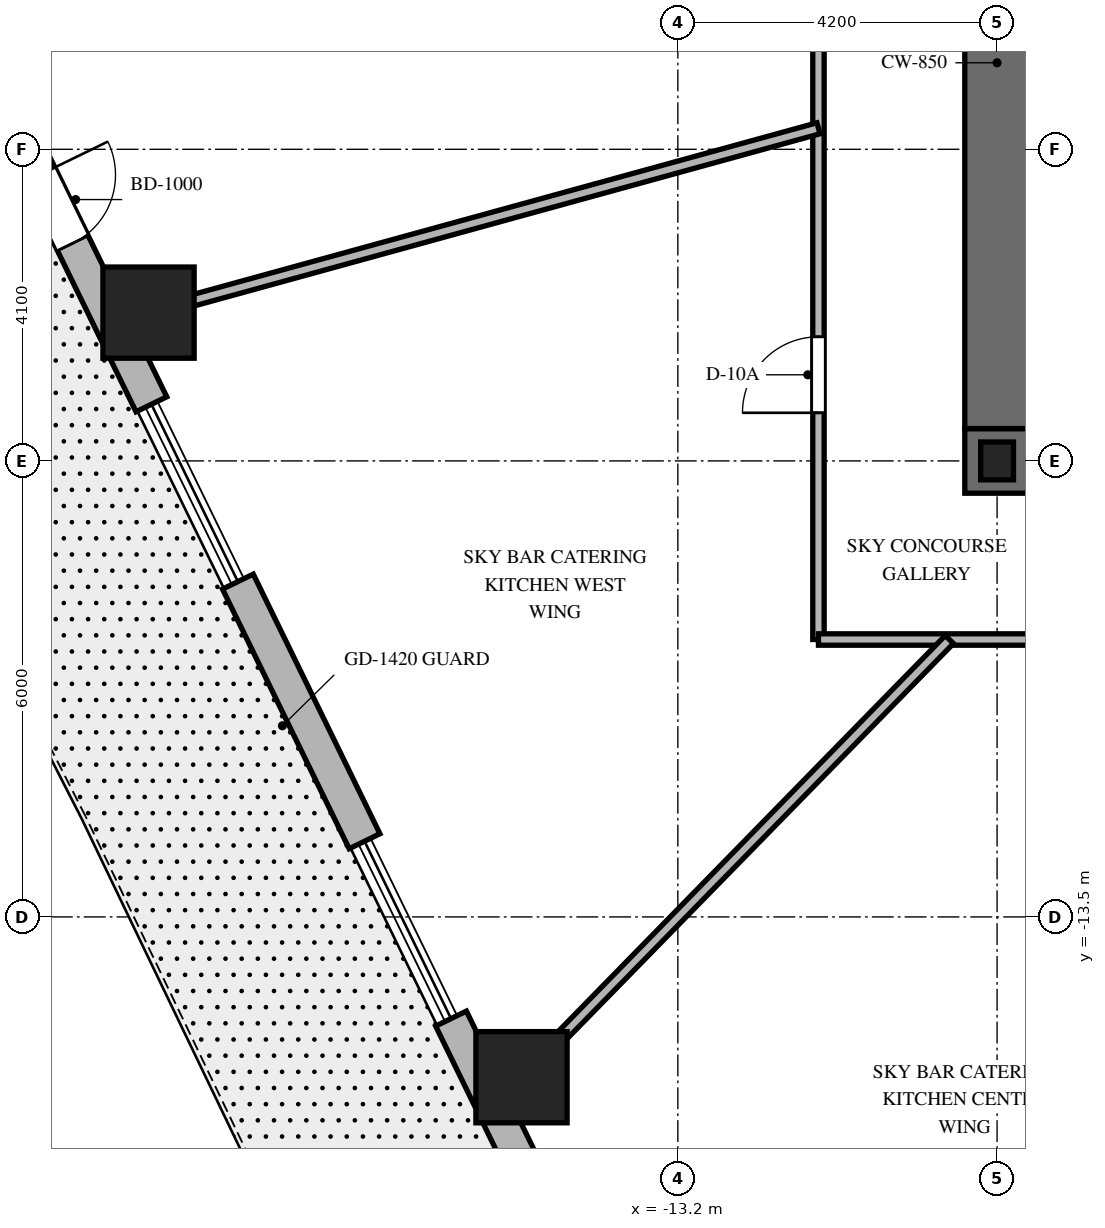
"""IFC4 building model, lengths in metres.
Left out: names, types, materials, properties, quantities, classifications, styles, units other than length and angle.
Written with IfcOpenShell. Run it as: python <this file> out.ifc"""

import sys

from ifc_helpers import new_model, si_unit, direction, frame, frame_2d, origin, origin_2d, place, context, subcontext, project, spatial, rectangle, i_section, extrude, element, fill, save


model = new_model("IFC4")
c1 = context("Model", 3, precision=1e-05, world=origin(), true_north=direction((0.0, 1.0)))
c2 = subcontext(c1, "Body", "Model", "MODEL_VIEW")
j1 = project(units=[si_unit("LENGTHUNIT", "METRE"), si_unit("PLANEANGLEUNIT", "RADIAN")], contexts=[c1])
p1 = place(None, origin())
s1 = spatial("IfcSite", under=j1, at=p1, CompositionType="ELEMENT")
p2 = place(p1, origin())
s2 = spatial("IfcBuilding", under=s1, at=p2, CompositionType="ELEMENT")
p3 = place(p2, frame((0.0, 0.0, 139.5)))
s3 = spatial("IfcBuildingStorey", under=s2, at=p3, CompositionType="ELEMENT", Elevation=139.5)
p4 = place(p3, frame((-9.425, -7.5, 0.0), z_axis=(0.0, 0.0, 1.0), x_axis=(1.0, 0.0, 0.0)))
e1 = element("IfcWall", 1, at=p4, inside=s3, PredefinedType="SHEAR", context=c2, shape_type="SweptSolid", body=[
    extrude(rectangle(XDim=18.85, YDim=0.85, at=frame_2d((9.425, 0.0))), origin(), (0.0, 0.0, 1.0), 4.8),
])
p5 = place(p4, frame((9.475, 0.0, 0.0)))
e2 = element("IfcOpeningElement", 2, at=p5, cuts=e1, PredefinedType="OPENING", context=c2, shape_type="SweptSolid", body=[
    extrude(rectangle(XDim=1.0, YDim=2.15, at=frame_2d((0.5, 1.075))), frame((0.0, 0.435, 0.0), z_axis=(0.0, -1.0, 0.0), x_axis=(1.0, 0.0, 0.0)), (0.0, 0.0, 1.0), 0.87),
])
p6 = place(p3, frame((-9.0, -7.075, 0.0), z_axis=(0.0, 0.0, 1.0), x_axis=(0.0, 1.0, 0.0)))
e3 = element("IfcWall", 3, at=p6, inside=s3, PredefinedType="SHEAR", context=c2, shape_type="SweptSolid", body=[
    extrude(rectangle(XDim=14.15, YDim=0.85, at=frame_2d((7.075, 0.0))), origin(), (0.0, 0.0, 1.0), 4.8),
])
p7 = place(p6, frame((10.2, 0.0, 0.0)))
e4 = element("IfcOpeningElement", 4, at=p7, cuts=e3, PredefinedType="OPENING", context=c2, shape_type="SweptSolid", body=[
    extrude(rectangle(XDim=1.05, YDim=2.15, at=frame_2d((0.525, 1.075))), frame((0.0, 0.435, 0.0), z_axis=(0.0, -1.0, 0.0), x_axis=(1.0, 0.0, 0.0)), (0.0, 0.0, 1.0), 0.87),
])
p8 = place(p3, frame((-9.0, -7.5, 0.0), z_axis=(0.0, 0.0, 1.0), x_axis=(1.0, 0.0, 0.0)))
e5 = element("IfcColumn", 5, at=p8, inside=s3, PredefinedType="COLUMN", context=c2, shape_type="SweptSolid", body=[
    extrude(i_section(OverallWidth=0.432, OverallDepth=0.498, WebThickness=0.056, FlangeThickness=0.089, at=origin_2d()), origin(), (0.0, 0.0, 1.0), 4.8),
])
for number, where, z_axis, x_axis in (
    (6, (-20.164, -5.549, 0.0), (0.0, 0.0, 1.0), (1.0, 0.0, 0.0)),
    (7, (-15.257, -15.609, 0.0), (0.0, 0.0, 1.0), (1.0, 0.0, 0.0)),
):
    element("IfcColumn", number, at=place(p3, frame(where, z_axis=z_axis, x_axis=x_axis)), inside=s3, PredefinedType="COLUMN", context=c2, shape_type="SweptSolid", body=[
        extrude(rectangle(XDim=1.2, YDim=1.2, at=origin_2d()), origin(), (0.0, 0.0, 1.0), 4.8),
    ])
p9 = place(p3, frame((-22.238, -2.427, 0.0), z_axis=(0.0, 0.0, 1.0), x_axis=(0.438370693728, -0.898794267272, 0.0)))
e8 = element("IfcWall", 8, at=p9, inside=s3, PredefinedType="SOLIDWALL", context=c2, shape_type="SweptSolid", body=[
    extrude(rectangle(XDim=4.816, YDim=0.45, at=frame_2d((2.408, 0.0))), origin(), (0.0, 0.0, 1.0), 4.5),
])
p10 = place(p9, frame((1.458, 0.0, 0.0)))
e9 = element("IfcOpeningElement", 9, at=p10, cuts=e8, PredefinedType="OPENING", context=c2, shape_type="SweptSolid", body=[
    extrude(rectangle(XDim=1.0, YDim=2.15, at=frame_2d((0.5, 1.075))), frame((0.0, 0.235, 0.0), z_axis=(0.0, -1.0, 0.0), x_axis=(1.0, 0.0, 0.0)), (0.0, 0.0, 1.0), 0.47),
])
p11 = place(p3, frame((-18.988, -9.088, 0.0), z_axis=(0.0, 0.0, 1.0), x_axis=(0.43837933929, -0.898790050503, 0.0)))
e10 = element("IfcWall", 10, at=p11, inside=s3, PredefinedType="SOLIDWALL", context=c2, shape_type="SweptSolid", body=[
    extrude(rectangle(XDim=3.801, YDim=0.45, at=frame_2d((1.9, 0.0))), origin(), (0.0, 0.0, 1.0), 4.5),
])
p12 = place(p3, frame((-16.184, -14.838, 0.0), z_axis=(0.0, 0.0, 1.0), x_axis=(0.43837962648, -0.898789910428, 0.0)))
e11 = element("IfcWall", 11, at=p12, inside=s3, PredefinedType="SOLIDWALL", context=c2, shape_type="SweptSolid", body=[
    extrude(rectangle(XDim=4.81, YDim=0.45, at=frame_2d((2.405, 0.0))), origin(), (0.0, 0.0, 1.0), 4.5),
])
p13 = place(p3, frame((-11.35, -9.85, 0.0), z_axis=(0.0, 0.0, 1.0), x_axis=(0.0, 1.0, 0.0)))
e12 = element("IfcWall", 12, at=p13, inside=s3, PredefinedType="PARTITIONING", context=c2, shape_type="SweptSolid", body=[
    extrude(rectangle(XDim=19.7, YDim=0.15, at=frame_2d((9.85, 0.0))), origin(), (0.0, 0.0, 1.0), 2.69),
])
p14 = place(p13, frame((15.18, 0.0, 0.0)))
e13 = element("IfcOpeningElement", 13, at=p14, cuts=e12, PredefinedType="OPENING", context=c2, shape_type="SweptSolid", body=[
    extrude(rectangle(XDim=1.0, YDim=2.03, at=frame_2d((0.5, 1.015))), frame((0.0, 0.085, 0.0), z_axis=(0.0, -1.0, 0.0), x_axis=(1.0, 0.0, 0.0)), (0.0, 0.0, 1.0), 0.17),
])
p15 = place(p13, frame((8.811, 0.0, 0.0)))
e14 = element("IfcOpeningElement", 14, at=p15, cuts=e12, PredefinedType="OPENING", context=c2, shape_type="SweptSolid", body=[
    extrude(rectangle(XDim=1.0, YDim=2.03, at=frame_2d((0.5, 1.015))), frame((0.0, 0.085, 0.0), z_axis=(0.0, -1.0, 0.0), x_axis=(1.0, 0.0, 0.0)), (0.0, 0.0, 1.0), 0.17),
])
p16 = place(p13, frame((2.983, 0.0, 0.0)))
e15 = element("IfcOpeningElement", 15, at=p16, cuts=e12, PredefinedType="OPENING", context=c2, shape_type="SweptSolid", body=[
    extrude(rectangle(XDim=1.0, YDim=2.03, at=frame_2d((0.5, 1.015))), frame((0.0, 0.085, 0.0), z_axis=(0.0, -1.0, 0.0), x_axis=(1.0, 0.0, 0.0)), (0.0, 0.0, 1.0), 0.17),
])
p17 = place(p3, frame((11.35, -9.85, 0.0), z_axis=(0.0, 0.0, 1.0), x_axis=(-1.0, 0.0, 0.0)))
e16 = element("IfcWall", 16, at=p17, inside=s3, PredefinedType="PARTITIONING", context=c2, shape_type="SweptSolid", body=[
    extrude(rectangle(XDim=22.7, YDim=0.15, at=frame_2d((11.35, 0.0))), origin(), (0.0, 0.0, 1.0), 2.69),
])
p18 = place(p17, frame((17.212, 0.0, 0.0)))
e17 = element("IfcOpeningElement", 17, at=p18, cuts=e16, PredefinedType="OPENING", context=c2, shape_type="SweptSolid", body=[
    extrude(rectangle(XDim=1.0, YDim=2.03, at=frame_2d((0.5, 1.015))), frame((0.0, 0.085, 0.0), z_axis=(0.0, -1.0, 0.0), x_axis=(1.0, 0.0, 0.0)), (0.0, 0.0, 1.0), 0.17),
])
p19 = place(p17, frame((10.425, 0.0, 0.0)))
e18 = element("IfcOpeningElement", 18, at=p19, cuts=e16, PredefinedType="OPENING", context=c2, shape_type="SweptSolid", body=[
    extrude(rectangle(XDim=1.0, YDim=2.03, at=frame_2d((0.5, 1.015))), frame((0.0, 0.085, 0.0), z_axis=(0.0, -1.0, 0.0), x_axis=(1.0, 0.0, 0.0)), (0.0, 0.0, 1.0), 0.17),
])
p20 = place(p17, frame((3.374, 0.0, 0.0)))
e19 = element("IfcOpeningElement", 19, at=p20, cuts=e16, PredefinedType="OPENING", context=c2, shape_type="SweptSolid", body=[
    extrude(rectangle(XDim=1.0, YDim=2.03, at=frame_2d((0.5, 1.015))), frame((0.0, 0.085, 0.0), z_axis=(0.0, -1.0, 0.0), x_axis=(1.0, 0.0, 0.0)), (0.0, 0.0, 1.0), 0.17),
])
p21 = place(p3, frame((-11.35, -3.123, 0.0), z_axis=(0.0, 0.0, 1.0), x_axis=(-0.964151983214, -0.265350623261, 0.0)))
e20 = element("IfcWall", 20, at=p21, inside=s3, PredefinedType="PARTITIONING", context=c2, shape_type="SweptSolid", body=[
    extrude(rectangle(XDim=9.645, YDim=0.15, at=frame_2d((4.823, 0.0))), origin(), (0.0, 0.0, 1.0), 2.69),
])
p22 = place(p3, frame((-9.628, -9.85, 0.0), z_axis=(0.0, 0.0, 1.0), x_axis=(-0.698992824326, -0.715128681805, 0.0)))
e21 = element("IfcWall", 21, at=p22, inside=s3, PredefinedType="PARTITIONING", context=c2, shape_type="SweptSolid", body=[
    extrude(rectangle(XDim=8.579, YDim=0.15, at=frame_2d((4.29, 0.0))), origin(), (0.0, 0.0, 1.0), 2.69),
])
p23 = place(p10, origin())
e22 = element("IfcDoor", 22, at=p23, inside=s3, OperationType="SINGLE_SWING_LEFT", PredefinedType="DOOR", context=c2, shape_type="SweptSolid", body=[
    extrude(rectangle(XDim=1.0, YDim=2.15, at=frame_2d((0.5, 1.075))), frame((0.0, 0.025, 0.0), z_axis=(0.0, -1.0, 0.0), x_axis=(1.0, 0.0, 0.0)), (0.0, 0.0, 1.0), 0.05),
])
fill(e9, e22)
p24 = place(p16, origin())
e23 = element("IfcDoor", 23, at=p24, inside=s3, OperationType="SINGLE_SWING_LEFT", PredefinedType="DOOR", context=c2, shape_type="SweptSolid", body=[
    extrude(rectangle(XDim=1.0, YDim=2.03, at=frame_2d((0.5, 1.015))), frame((0.0, 0.025, 0.0), z_axis=(0.0, -1.0, 0.0), x_axis=(1.0, 0.0, 0.0)), (0.0, 0.0, 1.0), 0.05),
])
fill(e15, e23)
save(model, sys.argv[1])
